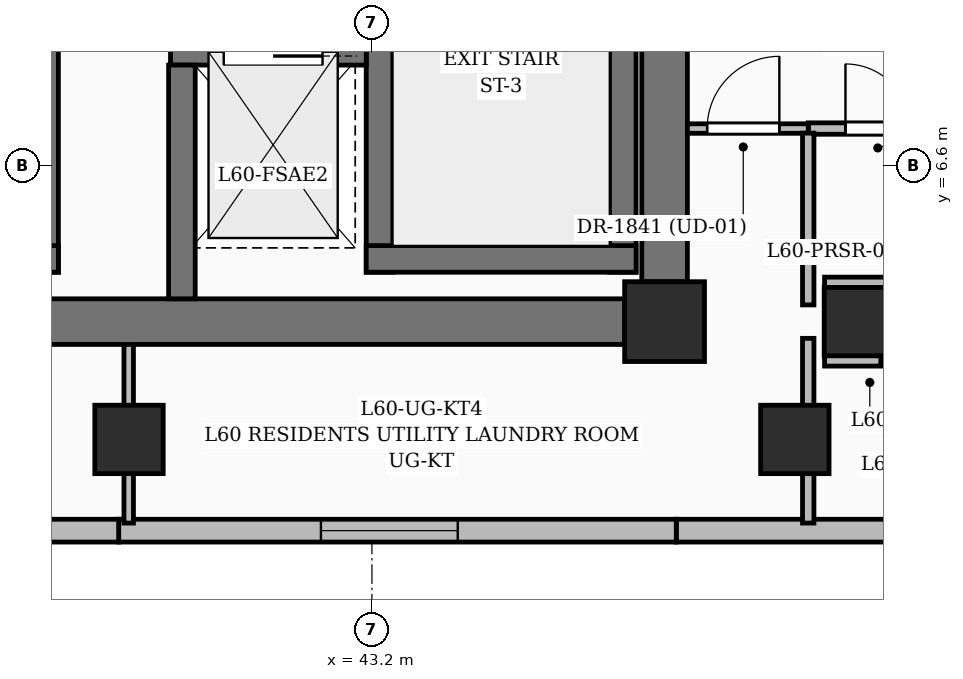
"""IFC4 building model, lengths in metres.
Left out: names, types, materials, properties, quantities, classifications, styles, units other than length and angle.
Written with IfcOpenShell. Run it as: python <this file> out.ifc"""

import sys

from ifc_helpers import new_model, si_unit, direction, frame, frame_2d, origin, origin_2d, place, context, subcontext, project, spatial, rectangle, extrude, element, fill, save


model = new_model("IFC4")
c1 = context("Model", 3, precision=1e-05, world=origin(), true_north=direction((0.0, 1.0)))
c2 = subcontext(c1, "Body", "Model", "MODEL_VIEW")
j1 = project(units=[si_unit("LENGTHUNIT", "METRE"), si_unit("PLANEANGLEUNIT", "RADIAN")], contexts=[c1])
p1 = place(None, origin())
s1 = spatial("IfcSite", under=j1, at=p1, CompositionType="ELEMENT")
p2 = place(p1, origin())
s2 = spatial("IfcBuilding", under=s1, at=p2, CompositionType="ELEMENT")
p3 = place(p2, frame((0.0, 0.0, 233.25)))
s3 = spatial("IfcBuildingStorey", under=s2, at=p3, CompositionType="ELEMENT", Elevation=233.25)
p4 = place(p3, frame((47.05, 4.55, 0.0), z_axis=(0.0, 0.0, 1.0), x_axis=(1.0, 0.0, 0.0)))
e1 = element("IfcColumn", 1, at=p4, inside=s3, PredefinedType="COLUMN", context=c2, shape_type="SweptSolid", body=[
    extrude(rectangle(XDim=1.05, YDim=1.05, at=origin_2d()), origin(), (0.0, 0.0, 1.0), 3.75),
])
p5 = place(p3, frame((49.6, 4.55, 0.0), z_axis=(0.0, 0.0, 1.0), x_axis=(1.0, 0.0, 0.0)))
e2 = element("IfcColumn", 2, at=p5, inside=s3, PredefinedType="COLUMN", context=c2, shape_type="SweptSolid", body=[
    extrude(rectangle(XDim=0.9, YDim=0.9, at=origin_2d()), origin(), (0.0, 0.0, 1.0), 3.75),
])
p6 = place(p3, frame((35.675, 4.55, 0.0), z_axis=(0.0, 0.0, 1.0), x_axis=(1.0, 0.0, 0.0)))
e3 = element("IfcWall", 3, at=p6, inside=s3, PredefinedType="SHEAR", context=c2, shape_type="SweptSolid", body=[
    extrude(rectangle(XDim=10.85, YDim=0.6, at=frame_2d((5.425, 0.0))), origin(), (0.0, 0.0, 1.0), 3.75),
])
p7 = place(p3, frame((47.05, 5.075, 0.0), z_axis=(0.0, 0.0, 1.0), x_axis=(0.0, 1.0, 0.0)))
e4 = element("IfcWall", 4, at=p7, inside=s3, PredefinedType="SHEAR", context=c2, shape_type="SweptSolid", body=[
    extrude(rectangle(XDim=9.15, YDim=0.6, at=frame_2d((4.575, 0.0))), origin(), (0.0, 0.0, 1.0), 3.75),
])
p8 = place(p3, frame((38.9, 5.2, 0.0), z_axis=(0.0, 0.0, 1.0), x_axis=(0.0, 1.0, 0.0)))
e5 = element("IfcWall", 5, at=p8, inside=s3, PredefinedType="SOLIDWALL", context=c2, shape_type="SweptSolid", body=[
    extrude(rectangle(XDim=9.25, YDim=0.35, at=frame_2d((4.625, 0.0))), origin(), (0.0, 0.0, 1.0), 3.75),
])
p9 = place(p8, frame((6.02, 0.0, 0.0)))
e6 = element("IfcOpeningElement", 6, at=p9, cuts=e5, PredefinedType="OPENING", context=c2, shape_type="SweptSolid", body=[
    extrude(rectangle(XDim=1.0, YDim=2.15, at=frame_2d((0.5, 1.075))), frame((0.0, 0.185, 0.0), z_axis=(0.0, -1.0, 0.0), x_axis=(1.0, 0.0, 0.0)), (0.0, 0.0, 1.0), 0.37),
])
p10 = place(p3, frame((35.525, 5.375, 0.0), z_axis=(0.0, 0.0, 1.0), x_axis=(1.0, 0.0, 0.0)))
e7 = element("IfcWall", 7, at=p10, inside=s3, PredefinedType="SOLIDWALL", context=c2, shape_type="SweptSolid", body=[
    extrude(rectangle(XDim=3.55, YDim=0.35, at=frame_2d((1.775, 0.0))), origin(), (0.0, 0.0, 1.0), 3.75),
])
p11 = place(p3, frame((43.3, 5.2, 0.0), z_axis=(0.0, 0.0, 1.0), x_axis=(0.0, 1.0, 0.0)))
e8 = element("IfcWall", 8, at=p11, inside=s3, PredefinedType="SOLIDWALL", context=c2, shape_type="SweptSolid", body=[
    extrude(rectangle(XDim=9.25, YDim=0.35, at=frame_2d((4.625, 0.0))), origin(), (0.0, 0.0, 1.0), 3.75),
])
p12 = place(p11, frame((6.02, 0.0, 0.0)))
e9 = element("IfcOpeningElement", 9, at=p12, cuts=e8, PredefinedType="OPENING", context=c2, shape_type="SweptSolid", body=[
    extrude(rectangle(XDim=1.0, YDim=2.15, at=frame_2d((0.5, 1.075))), frame((0.0, 0.185, 0.0), z_axis=(0.0, -1.0, 0.0), x_axis=(1.0, 0.0, 0.0)), (0.0, 0.0, 1.0), 0.37),
])
p13 = place(p3, frame((46.5, 5.2, 0.0), z_axis=(0.0, 0.0, 1.0), x_axis=(0.0, 1.0, 0.0)))
e10 = element("IfcWall", 10, at=p13, inside=s3, PredefinedType="SOLIDWALL", context=c2, shape_type="SweptSolid", body=[
    extrude(rectangle(XDim=9.25, YDim=0.35, at=frame_2d((4.625, 0.0))), origin(), (0.0, 0.0, 1.0), 3.75),
])
p14 = place(p3, frame((43.125, 5.375, 0.0), z_axis=(0.0, 0.0, 1.0), x_axis=(1.0, 0.0, 0.0)))
e11 = element("IfcWall", 11, at=p14, inside=s3, PredefinedType="SOLIDWALL", context=c2, shape_type="SweptSolid", body=[
    extrude(rectangle(XDim=3.55, YDim=0.35, at=frame_2d((1.775, 0.0))), origin(), (0.0, 0.0, 1.0), 3.75),
])
p15 = place(p3, frame((40.55, 8.1, 0.0), z_axis=(0.0, 0.0, 1.0), x_axis=(1.0, 0.0, 0.0)))
e12 = element("IfcWall", 12, at=p15, inside=s3, PredefinedType="SOLIDWALL", context=c2, shape_type="SweptSolid", body=[
    extrude(rectangle(XDim=2.575, YDim=0.35, at=frame_2d((1.288, 0.0))), origin(), (0.0, 0.0, 1.0), 3.75),
])
p16 = place(p15, frame((0.7, 0.0, 0.0)))
e13 = element("IfcOpeningElement", 13, at=p16, cuts=e12, PredefinedType="OPENING", context=c2, shape_type="SweptSolid", body=[
    extrude(rectangle(XDim=1.3, YDim=2.25, at=frame_2d((0.65, 1.125))), frame((0.0, 0.185, 0.0), z_axis=(0.0, -1.0, 0.0), x_axis=(1.0, 0.0, 0.0)), (0.0, 0.0, 1.0), 0.37),
])
p17 = place(p3, frame((40.7, 4.85, 0.0), z_axis=(0.0, 0.0, 1.0), x_axis=(0.0, 1.0, 0.0)))
e14 = element("IfcWall", 14, at=p17, inside=s3, PredefinedType="SOLIDWALL", context=c2, shape_type="SweptSolid", body=[
    extrude(rectangle(XDim=3.075, YDim=0.35, at=frame_2d((1.538, 0.0))), origin(), (0.0, 0.0, 1.0), 3.75),
])
for number, where, z_axis, x_axis in (
    (15, (40.004, 3.0, 0.0), (0.0, 0.0, 1.0), (1.0, 0.0, 0.0)),
    (16, (48.764, 3.0, 0.0), (0.0, 0.0, 1.0), (1.0, 0.0, 0.0)),
):
    element("IfcColumn", number, at=place(p3, frame(where, z_axis=z_axis, x_axis=x_axis)), inside=s3, PredefinedType="COLUMN", context=c2, shape_type="SweptSolid", body=[
        extrude(rectangle(XDim=0.9, YDim=0.9, at=origin_2d()), origin(), (0.0, 0.0, 1.0), 3.75),
    ])
p18 = place(p3, frame((53.975, 1.8, 0.0), z_axis=(0.0, 0.0, 1.0), x_axis=(-1.0, 0.0, 0.0)))
e17 = element("IfcWall", 17, at=p18, inside=s3, PredefinedType="SOLIDWALL", context=c2, shape_type="SweptSolid", body=[
    extrude(rectangle(XDim=6.771, YDim=0.3, at=frame_2d((3.385, 0.0))), origin(), (0.0, 0.0, 1.0), 3.5),
])
p19 = place(p3, frame((47.204, 1.8, 0.0), z_axis=(0.0, 0.0, 1.0), x_axis=(-1.0, 0.0, 0.0)))
e18 = element("IfcWall", 18, at=p19, inside=s3, PredefinedType="SOLIDWALL", context=c2, shape_type="SweptSolid", body=[
    extrude(rectangle(XDim=7.336, YDim=0.3, at=frame_2d((3.668, 0.0))), origin(), (0.0, 0.0, 1.0), 3.5),
])
p20 = place(p19, frame((2.875, 0.0, 0.6)))
e19 = element("IfcOpeningElement", 19, at=p20, cuts=e18, PredefinedType="OPENING", context=c2, shape_type="SweptSolid", body=[
    extrude(rectangle(XDim=1.8, YDim=2.1, at=frame_2d((0.9, 1.05))), frame((0.0, 0.16, 0.0), z_axis=(0.0, -1.0, 0.0), x_axis=(1.0, 0.0, 0.0)), (0.0, 0.0, 1.0), 0.32),
])
p21 = place(p3, frame((39.868, 1.8, 0.0), z_axis=(0.0, 0.0, 1.0), x_axis=(-1.0, 0.0, 0.0)))
e20 = element("IfcWall", 20, at=p21, inside=s3, PredefinedType="SOLIDWALL", context=c2, shape_type="SweptSolid", body=[
    extrude(rectangle(XDim=7.336, YDim=0.3, at=frame_2d((3.668, 0.0))), origin(), (0.0, 0.0, 1.0), 3.5),
])
p22 = place(p21, frame((2.85, 0.0, 0.55)))
e21 = element("IfcOpeningElement", 21, at=p22, cuts=e20, PredefinedType="OPENING", context=c2, shape_type="SweptSolid", body=[
    extrude(rectangle(XDim=1.6, YDim=2.2, at=frame_2d((0.8, 1.1))), frame((0.0, 0.16, 0.0), z_axis=(0.0, -1.0, 0.0), x_axis=(1.0, 0.0, 0.0)), (0.0, 0.0, 1.0), 0.32),
])
p23 = place(p3, frame((40.0, 1.9, 0.0), z_axis=(0.0, 0.0, 1.0), x_axis=(0.0, 1.0, 0.0)))
e22 = element("IfcWall", 22, at=p23, inside=s3, PredefinedType="PARTITIONING", context=c2, shape_type="SweptSolid", body=[
    extrude(rectangle(XDim=2.35, YDim=0.125, at=frame_2d((1.175, 0.0))), origin(), (0.0, 0.0, 1.0), 3.5),
])
p24 = place(p3, frame((48.94, 7.09, 0.0), z_axis=(0.0, 0.0, 1.0), x_axis=(1.0, 0.0, 0.0)))
e23 = element("IfcWall", 23, at=p24, inside=s3, PredefinedType="PARTITIONING", context=c2, shape_type="SweptSolid", body=[
    extrude(rectangle(XDim=1.83, YDim=0.15, at=frame_2d((0.915, 0.0))), origin(), (0.0, 0.0, 1.0), 3.5),
])
p25 = place(p24, frame((0.49, 0.0, 0.0)))
e24 = element("IfcOpeningElement", 24, at=p25, cuts=e23, PredefinedType="OPENING", context=c2, shape_type="SweptSolid", body=[
    extrude(rectangle(XDim=0.85, YDim=2.1, at=frame_2d((0.425, 1.05))), frame((0.0, 0.085, 0.0), z_axis=(0.0, -1.0, 0.0), x_axis=(1.0, 0.0, 0.0)), (0.0, 0.0, 1.0), 0.17),
])
p26 = place(p3, frame((47.35, 7.09, 0.0), z_axis=(0.0, 0.0, 1.0), x_axis=(1.0, 0.0, 0.0)))
e25 = element("IfcWall", 25, at=p26, inside=s3, PredefinedType="PARTITIONING", context=c2, shape_type="SweptSolid", body=[
    extrude(rectangle(XDim=1.59, YDim=0.125, at=frame_2d((0.795, 0.0))), origin(), (0.0, 0.0, 1.0), 2.685),
])
p27 = place(p26, frame((0.26, 0.0, 0.0)))
e26 = element("IfcOpeningElement", 26, at=p27, cuts=e25, PredefinedType="OPENING", context=c2, shape_type="SweptSolid", body=[
    extrude(rectangle(XDim=0.95, YDim=2.2, at=frame_2d((0.475, 1.1))), frame((0.0, 0.072, 0.0), z_axis=(0.0, -1.0, 0.0), x_axis=(1.0, 0.0, 0.0)), (0.0, 0.0, 1.0), 0.145),
])
p28 = place(p3, frame((48.94, 4.33, 0.0), z_axis=(0.0, 0.0, 1.0), x_axis=(0.0, -1.0, 0.0)))
e27 = element("IfcWall", 27, at=p28, inside=s3, PredefinedType="PARTITIONING", context=c2, shape_type="SweptSolid", body=[
    extrude(rectangle(XDim=2.43, YDim=0.15, at=frame_2d((1.215, 0.0))), origin(), (0.0, 0.0, 1.0), 2.82),
])
p29 = place(p3, frame((48.94, 7.03, 0.0), z_axis=(0.0, 0.0, 1.0), x_axis=(0.0, -1.0, 0.0)))
e28 = element("IfcWall", 28, at=p29, inside=s3, PredefinedType="PARTITIONING", context=c2, shape_type="SweptSolid", body=[
    extrude(rectangle(XDim=2.26, YDim=0.15, at=frame_2d((1.13, 0.0))), origin(), (0.0, 0.0, 1.0), 3.5),
])
p30 = place(p3, frame((49.155, 5.06, 0.0), z_axis=(0.0, 0.0, 1.0), x_axis=(1.0, 0.0, 0.0)))
e29 = element("IfcWall", 29, at=p30, inside=s3, PredefinedType="PARTITIONING", context=c2, shape_type="SweptSolid", body=[
    extrude(rectangle(XDim=0.955, YDim=0.15, at=frame_2d((0.478, 0.0))), origin(), (0.0, 0.0, 1.0), 2.82),
])
p31 = place(p3, frame((49.895, 4.04, 0.0), z_axis=(0.0, 0.0, 1.0), x_axis=(-1.0, 0.0, 0.0)))
e30 = element("IfcWall", 30, at=p31, inside=s3, PredefinedType="PARTITIONING", context=c2, shape_type="SweptSolid", body=[
    extrude(rectangle(XDim=0.74, YDim=0.15, at=frame_2d((0.37, 0.0))), origin(), (0.0, 0.0, 1.0), 2.82),
])
p32 = place(p20, origin())
e31 = element("IfcWindow", 31, at=p32, inside=s3, PartitioningType="SINGLE_PANEL", PredefinedType="WINDOW", context=c2, shape_type="SweptSolid", body=[
    extrude(rectangle(XDim=1.8, YDim=2.1, at=frame_2d((0.9, 1.05))), frame((0.0, 0.03, 0.0), z_axis=(0.0, -1.0, 0.0), x_axis=(1.0, 0.0, 0.0)), (0.0, 0.0, 1.0), 0.06),
])
fill(e19, e31)
p33 = place(p16, origin())
e32 = element("IfcDoor", 32, at=p33, inside=s3, OperationType="DOUBLE_DOOR_SLIDING", PredefinedType="DOOR", context=c2, shape_type="SweptSolid", body=[
    extrude(rectangle(XDim=1.3, YDim=2.25, at=frame_2d((0.65, 1.125))), frame((0.0, 0.025, 0.0), z_axis=(0.0, -1.0, 0.0), x_axis=(1.0, 0.0, 0.0)), (0.0, 0.0, 1.0), 0.05),
])
fill(e13, e32)
p34 = place(p27, origin())
e33 = element("IfcDoor", 33, at=p34, inside=s3, OperationType="SINGLE_SWING_RIGHT", PredefinedType="DOOR", context=c2, shape_type="SweptSolid", body=[
    extrude(rectangle(XDim=0.95, YDim=2.2, at=frame_2d((0.475, 1.1))), frame((0.0, 0.025, 0.0), z_axis=(0.0, -1.0, 0.0), x_axis=(1.0, 0.0, 0.0)), (0.0, 0.0, 1.0), 0.05),
])
fill(e26, e33)
p35 = place(p25, origin())
e34 = element("IfcDoor", 34, at=p35, inside=s3, OperationType="SINGLE_SWING_LEFT", PredefinedType="DOOR", context=c2, shape_type="SweptSolid", body=[
    extrude(rectangle(XDim=0.85, YDim=2.1, at=frame_2d((0.425, 1.05))), frame((0.0, 0.025, 0.0), z_axis=(0.0, -1.0, 0.0), x_axis=(1.0, 0.0, 0.0)), (0.0, 0.0, 1.0), 0.05),
])
fill(e24, e34)
save(model, sys.argv[1])
